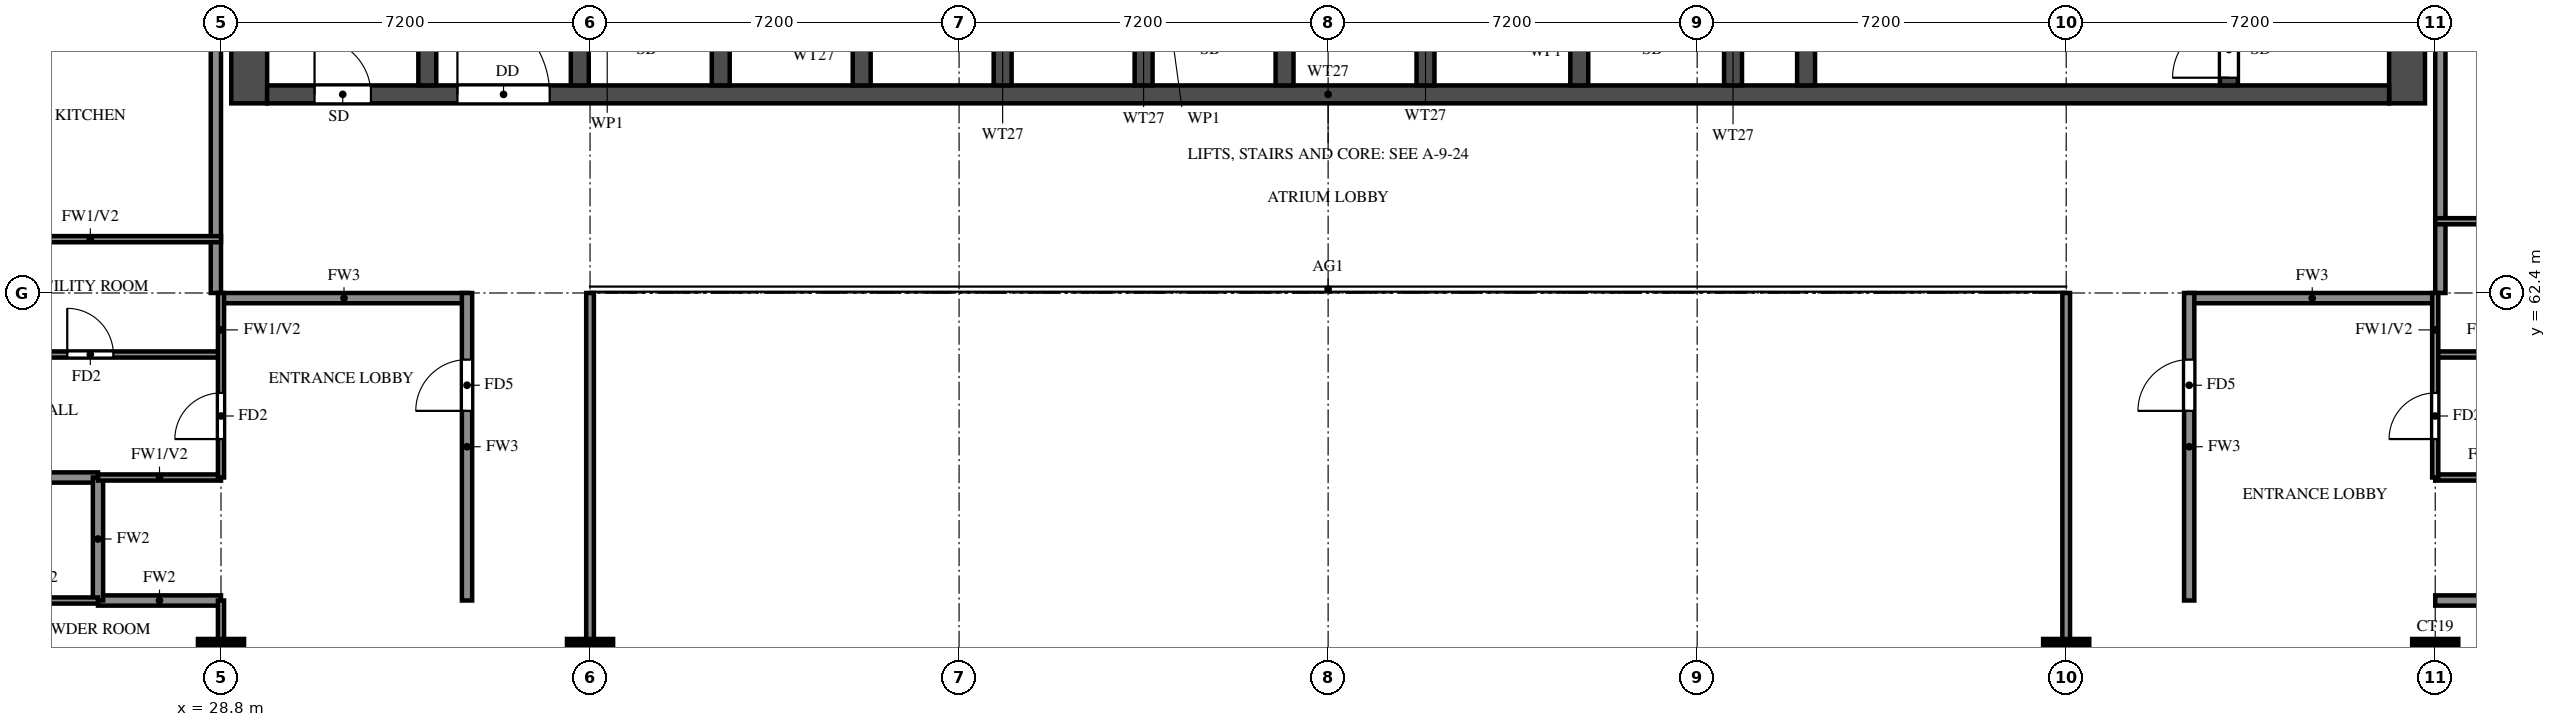
"""IFC4 building model, lengths in metres.
Left out: names, types, materials, properties, quantities, classifications, styles, units other than length and angle.
Written with IfcOpenShell. Run it as: python <this file> out.ifc"""

import sys

from ifc_helpers import new_model, si_unit, direction, frame, frame_2d, origin, origin_2d, place, context, subcontext, project, spatial, rectangle, extrude, source, transform, mapped, element, fill, save


model = new_model("IFC4")
c1 = context("Model", 3, precision=1e-05, world=origin(), true_north=direction((0.0, 1.0)))
c2 = subcontext(c1, "Body", "Model", "MODEL_VIEW")
j1 = project(units=[si_unit("LENGTHUNIT", "METRE"), si_unit("PLANEANGLEUNIT", "RADIAN")], contexts=[c1])
p1 = place(None, origin())
s1 = spatial("IfcSite", under=j1, at=p1, CompositionType="ELEMENT")
p2 = place(p1, origin())
s2 = spatial("IfcBuilding", under=s1, at=p2, CompositionType="ELEMENT")
p3 = place(p2, frame((0.0, 0.0, 178.0)))
s3 = spatial("IfcBuildingStorey", under=s2, at=p3, CompositionType="ELEMENT", Elevation=178.0)
m1 = source(origin(), c2, "Body", "SweptSolid", [
    extrude(rectangle(XDim=0.9, YDim=0.9, at=origin_2d()), origin(), (0.0, 0.0, 1.0), 3.2),
])
for number, where, z_axis, x_axis in (
    (1, (28.8, 55.2, 0.0), (0.0, 0.0, 1.0), (1.0, 0.0, 0.0)),
    (2, (36.0, 55.2, 0.0), (0.0, 0.0, 1.0), (1.0, 0.0, 0.0)),
    (3, (64.8, 55.2, 0.0), (0.0, 0.0, 1.0), (1.0, 0.0, 0.0)),
    (4, (72.0, 55.2, 0.0), (0.0, 0.0, 1.0), (1.0, 0.0, 0.0)),
):
    element("IfcColumn", number, at=place(p3, frame(where, z_axis=z_axis, x_axis=x_axis)), inside=s3, PredefinedType="COLUMN", context=c2, shape_type="MappedRepresentation", body=[
        mapped(m1, transform((0.0, 0.0, 0.0))),
    ])
for number, where, z_axis, x_axis in (
    (5, (29.35, 66.1, 0.0), (0.0, 0.0, 1.0), (0.0, 1.0, 0.0)),
    (6, (71.45, 66.1, 0.0), (0.0, 0.0, 1.0), (0.0, 1.0, 0.0)),
):
    element("IfcWall", number, at=place(p3, frame(where, z_axis=z_axis, x_axis=x_axis)), inside=s3, PredefinedType="SHEAR", context=c2, shape_type="SweptSolid", body=[
        extrude(rectangle(XDim=11.9, YDim=0.7, at=frame_2d((5.95, 0.0))), origin(), (0.0, 0.0, 1.0), 3.2),
    ])
p4 = place(p3, frame((29.7, 66.275, 0.0), z_axis=(0.0, 0.0, 1.0), x_axis=(1.0, 0.0, 0.0)))
e7 = element("IfcWall", 7, at=p4, inside=s3, PredefinedType="SHEAR", context=c2, shape_type="SweptSolid", body=[
    extrude(rectangle(XDim=41.4, YDim=0.35, at=frame_2d((20.7, 0.0))), origin(), (0.0, 0.0, 1.0), 3.2),
])
p5 = place(p4, frame((0.925, 0.0, 0.0)))
e8 = element("IfcOpeningElement", 8, at=p5, cuts=e7, PredefinedType="OPENING", context=c2, shape_type="SweptSolid", body=[
    extrude(rectangle(XDim=1.1, YDim=2.1, at=frame_2d((0.55, 1.05))), frame((0.0, 0.185, 0.0), z_axis=(0.0, -1.0, 0.0), x_axis=(1.0, 0.0, 0.0)), (0.0, 0.0, 1.0), 0.37),
])
p6 = place(p4, frame((3.712, 0.0, 0.0)))
e9 = element("IfcOpeningElement", 9, at=p6, cuts=e7, PredefinedType="OPENING", context=c2, shape_type="SweptSolid", body=[
    extrude(rectangle(XDim=1.8, YDim=2.1, at=frame_2d((0.9, 1.05))), frame((0.0, 0.185, 0.0), z_axis=(0.0, -1.0, 0.0), x_axis=(1.0, 0.0, 0.0)), (0.0, 0.0, 1.0), 0.37),
])
p7 = place(p3, frame((32.825, 66.45, 0.0), z_axis=(0.0, 0.0, 1.0), x_axis=(0.0, 1.0, 0.0)))
e10 = element("IfcWall", 10, at=p7, inside=s3, PredefinedType="SHEAR", context=c2, shape_type="SweptSolid", body=[
    extrude(rectangle(XDim=10.85, YDim=0.35, at=frame_2d((5.425, 0.0))), origin(), (0.0, 0.0, 1.0), 3.2),
])
p8 = place(p3, frame((67.975, 66.45, 0.0), z_axis=(0.0, 0.0, 1.0), x_axis=(0.0, 1.0, 0.0)))
e11 = element("IfcWall", 11, at=p8, inside=s3, PredefinedType="SHEAR", context=c2, shape_type="SweptSolid", body=[
    extrude(rectangle(XDim=10.85, YDim=0.35, at=frame_2d((5.425, 0.0))), origin(), (0.0, 0.0, 1.0), 3.2),
])
p9 = place(p8, frame((0.15, 0.0, 0.0)))
e12 = element("IfcOpeningElement", 12, at=p9, cuts=e11, PredefinedType="OPENING", context=c2, shape_type="SweptSolid", body=[
    extrude(rectangle(XDim=1.1, YDim=2.1, at=frame_2d((0.55, 1.05))), frame((0.0, 0.185, 0.0), z_axis=(0.0, -1.0, 0.0), x_axis=(1.0, 0.0, 0.0)), (0.0, 0.0, 1.0), 0.37),
])
p10 = place(p3, frame((59.725, 66.45, 0.0), z_axis=(0.0, 0.0, 1.0), x_axis=(0.0, 1.0, 0.0)))
e13 = element("IfcWall", 13, at=p10, inside=s3, PredefinedType="SHEAR", context=c2, shape_type="SweptSolid", body=[
    extrude(rectangle(XDim=6.125, YDim=0.35, at=frame_2d((3.062, 0.0))), origin(), (0.0, 0.0, 1.0), 3.2),
])
p11 = place(p10, frame((3.85, 0.0, 0.0)))
e14 = element("IfcOpeningElement", 14, at=p11, cuts=e13, PredefinedType="OPENING", context=c2, shape_type="SweptSolid", body=[
    extrude(rectangle(XDim=1.2, YDim=2.1, at=frame_2d((0.6, 1.05))), frame((0.0, 0.185, 0.0), z_axis=(0.0, -1.0, 0.0), x_axis=(1.0, 0.0, 0.0)), (0.0, 0.0, 1.0), 0.37),
])
for number, where, z_axis, x_axis in (
    (15, (35.8, 66.45, 0.0), (0.0, 0.0, 1.0), (0.0, 1.0, 0.0)),
    (16, (38.55, 66.45, 0.0), (0.0, 0.0, 1.0), (0.0, 1.0, 0.0)),
    (17, (41.3, 66.45, 0.0), (0.0, 0.0, 1.0), (0.0, 1.0, 0.0)),
    (18, (44.05, 66.45, 0.0), (0.0, 0.0, 1.0), (0.0, 1.0, 0.0)),
    (19, (46.8, 66.45, 0.0), (0.0, 0.0, 1.0), (0.0, 1.0, 0.0)),
    (20, (49.55, 66.45, 0.0), (0.0, 0.0, 1.0), (0.0, 1.0, 0.0)),
    (21, (52.3, 66.45, 0.0), (0.0, 0.0, 1.0), (0.0, 1.0, 0.0)),
    (22, (55.3, 66.45, 0.0), (0.0, 0.0, 1.0), (0.0, 1.0, 0.0)),
    (23, (58.3, 66.45, 0.0), (0.0, 0.0, 1.0), (0.0, 1.0, 0.0)),
):
    element("IfcWall", number, at=place(p3, frame(where, z_axis=z_axis, x_axis=x_axis)), inside=s3, PredefinedType="SHEAR", context=c2, shape_type="SweptSolid", body=[
        extrude(rectangle(XDim=2.425, YDim=0.35, at=frame_2d((1.212, 0.0))), origin(), (0.0, 0.0, 1.0), 3.2),
    ])
for number, where, z_axis, x_axis in (
    (24, (28.8, 62.3, 0.0), (0.0, 0.0, 1.0), (1.0, 0.0, 0.0)),
    (25, (67.2, 62.3, 0.0), (0.0, 0.0, 1.0), (1.0, 0.0, 0.0)),
):
    element("IfcWall", number, at=place(p3, frame(where, z_axis=z_axis, x_axis=x_axis)), inside=s3, PredefinedType="SOLIDWALL", context=c2, shape_type="SweptSolid", body=[
        extrude(rectangle(XDim=4.8, YDim=0.2, at=frame_2d((2.4, 0.0))), origin(), (0.0, 0.0, 1.0), 3.2),
    ])
p12 = place(p3, frame((28.7, 62.4, 0.0), z_axis=(0.0, 0.0, 1.0), x_axis=(0.0, 1.0, 0.0)))
e26 = element("IfcWall", 26, at=p12, inside=s3, PredefinedType="SOLIDWALL", context=c2, shape_type="SweptSolid", body=[
    extrude(rectangle(XDim=15.6, YDim=0.2, at=frame_2d((7.8, 0.0))), origin(), (0.0, 0.0, 1.0), 3.2),
])
p13 = place(p3, frame((33.6, 56.4, 0.0), z_axis=(0.0, 0.0, 1.0), x_axis=(0.0, 1.0, 0.0)))
e27 = element("IfcWall", 27, at=p13, inside=s3, PredefinedType="SOLIDWALL", context=c2, shape_type="SweptSolid", body=[
    extrude(rectangle(XDim=6.0, YDim=0.2, at=frame_2d((3.0, 0.0))), origin(), (0.0, 0.0, 1.0), 3.2),
])
p14 = place(p13, frame((3.7, 0.0, 0.0)))
e28 = element("IfcOpeningElement", 28, at=p14, cuts=e27, PredefinedType="OPENING", context=c2, shape_type="SweptSolid", body=[
    extrude(rectangle(XDim=1.0, YDim=2.1, at=frame_2d((0.5, 1.05))), frame((0.0, 0.11, 0.0), z_axis=(0.0, -1.0, 0.0), x_axis=(1.0, 0.0, 0.0)), (0.0, 0.0, 1.0), 0.22),
])
p15 = place(p3, frame((67.2, 56.4, 0.0), z_axis=(0.0, 0.0, 1.0), x_axis=(0.0, 1.0, 0.0)))
e29 = element("IfcWall", 29, at=p15, inside=s3, PredefinedType="SOLIDWALL", context=c2, shape_type="SweptSolid", body=[
    extrude(rectangle(XDim=6.0, YDim=0.2, at=frame_2d((3.0, 0.0))), origin(), (0.0, 0.0, 1.0), 3.2),
])
p16 = place(p15, frame((3.7, 0.0, 0.0)))
e30 = element("IfcOpeningElement", 30, at=p16, cuts=e29, PredefinedType="OPENING", context=c2, shape_type="SweptSolid", body=[
    extrude(rectangle(XDim=1.0, YDim=2.1, at=frame_2d((0.5, 1.05))), frame((0.0, 0.11, 0.0), z_axis=(0.0, -1.0, 0.0), x_axis=(1.0, 0.0, 0.0)), (0.0, 0.0, 1.0), 0.22),
])
p17 = place(p3, frame((72.1, 62.4, 0.0), z_axis=(0.0, 0.0, 1.0), x_axis=(0.0, 1.0, 0.0)))
e31 = element("IfcWall", 31, at=p17, inside=s3, PredefinedType="SOLIDWALL", context=c2, shape_type="SweptSolid", body=[
    extrude(rectangle(XDim=15.6, YDim=0.2, at=frame_2d((7.8, 0.0))), origin(), (0.0, 0.0, 1.0), 3.2),
])
p18 = place(p3, frame((26.4, 56.4, 0.0), z_axis=(0.0, 0.0, 1.0), x_axis=(1.0, 0.0, 0.0)))
e32 = element("IfcWall", 32, at=p18, inside=s3, PredefinedType="SOLIDWALL", context=c2, shape_type="SweptSolid", body=[
    extrude(rectangle(XDim=2.4, YDim=0.2, at=frame_2d((1.2, 0.0))), origin(), (0.0, 0.0, 1.0), 3.2),
])
p19 = place(p3, frame((72.0, 56.4, 0.0), z_axis=(0.0, 0.0, 1.0), x_axis=(1.0, 0.0, 0.0)))
e33 = element("IfcWall", 33, at=p19, inside=s3, PredefinedType="SOLIDWALL", context=c2, shape_type="SweptSolid", body=[
    extrude(rectangle(XDim=2.4, YDim=0.2, at=frame_2d((1.2, 0.0))), origin(), (0.0, 0.0, 1.0), 3.2),
])
p20 = place(p3, frame((14.525, 58.8, 0.0), z_axis=(0.0, 0.0, 1.0), x_axis=(1.0, 0.0, 0.0)))
e34 = element("IfcWall", 34, at=p20, inside=s3, PredefinedType="SOLIDWALL", context=c2, shape_type="SweptSolid", body=[
    extrude(rectangle(XDim=11.875, YDim=0.2, at=frame_2d((5.938, 0.0))), origin(), (0.0, 0.0, 1.0), 2.3),
])
p21 = place(p3, frame((26.4, 56.4, 0.0), z_axis=(0.0, 0.0, 1.0), x_axis=(0.0, 1.0, 0.0)))
e35 = element("IfcWall", 35, at=p21, inside=s3, PredefinedType="SOLIDWALL", context=c2, shape_type="SweptSolid", body=[
    extrude(rectangle(XDim=2.4, YDim=0.2, at=frame_2d((1.2, 0.0))), origin(), (0.0, 0.0, 1.0), 3.2),
])
p22 = place(p3, frame((23.7, 56.4, 0.0), z_axis=(0.0, 0.0, 1.0), x_axis=(1.0, 0.0, 0.0)))
e36 = element("IfcWall", 36, at=p22, inside=s3, PredefinedType="PARTITIONING", context=c2, shape_type="SweptSolid", body=[
    extrude(rectangle(XDim=2.7, YDim=0.12, at=frame_2d((1.35, 0.0))), origin(), (0.0, 0.0, 1.0), 3.2),
])
p23 = place(p3, frame((26.4, 58.8, 0.0), z_axis=(0.0, 0.0, 1.0), x_axis=(1.0, 0.0, 0.0)))
e37 = element("IfcWall", 37, at=p23, inside=s3, PredefinedType="PARTITIONING", context=c2, shape_type="SweptSolid", body=[
    extrude(rectangle(XDim=2.4, YDim=0.12, at=frame_2d((1.2, 0.0))), origin(), (0.0, 0.0, 1.0), 3.2),
])
p24 = place(p3, frame((72.0, 58.8, 0.0), z_axis=(0.0, 0.0, 1.0), x_axis=(1.0, 0.0, 0.0)))
e38 = element("IfcWall", 38, at=p24, inside=s3, PredefinedType="PARTITIONING", context=c2, shape_type="SweptSolid", body=[
    extrude(rectangle(XDim=2.4, YDim=0.12, at=frame_2d((1.2, 0.0))), origin(), (0.0, 0.0, 1.0), 3.2),
])
p25 = place(p3, frame((23.7, 61.2, 0.0), z_axis=(0.0, 0.0, 1.0), x_axis=(1.0, 0.0, 0.0)))
e39 = element("IfcWall", 39, at=p25, inside=s3, PredefinedType="PARTITIONING", context=c2, shape_type="SweptSolid", body=[
    extrude(rectangle(XDim=5.1, YDim=0.12, at=frame_2d((2.55, 0.0))), origin(), (0.0, 0.0, 1.0), 3.2),
])
p26 = place(p25, frame((2.1, 0.0, 0.0)))
e40 = element("IfcOpeningElement", 40, at=p26, cuts=e39, PredefinedType="OPENING", context=c2, shape_type="SweptSolid", body=[
    extrude(rectangle(XDim=0.9, YDim=2.1, at=frame_2d((0.45, 1.05))), frame((0.0, 0.07, 0.0), z_axis=(0.0, -1.0, 0.0), x_axis=(1.0, 0.0, 0.0)), (0.0, 0.0, 1.0), 0.14),
])
p27 = place(p3, frame((72.0, 61.2, 0.0), z_axis=(0.0, 0.0, 1.0), x_axis=(1.0, 0.0, 0.0)))
e41 = element("IfcWall", 41, at=p27, inside=s3, PredefinedType="PARTITIONING", context=c2, shape_type="SweptSolid", body=[
    extrude(rectangle(XDim=5.1, YDim=0.12, at=frame_2d((2.55, 0.0))), origin(), (0.0, 0.0, 1.0), 3.2),
])
p28 = place(p27, frame((2.1, 0.0, 0.0)))
e42 = element("IfcOpeningElement", 42, at=p28, cuts=e41, PredefinedType="OPENING", context=c2, shape_type="SweptSolid", body=[
    extrude(rectangle(XDim=0.9, YDim=2.1, at=frame_2d((0.45, 1.05))), frame((0.0, 0.07, 0.0), z_axis=(0.0, -1.0, 0.0), x_axis=(1.0, 0.0, 0.0)), (0.0, 0.0, 1.0), 0.14),
])
for number, where, z_axis, x_axis in (
    (43, (23.7, 63.45, 0.0), (0.0, 0.0, 1.0), (1.0, 0.0, 0.0)),
    (44, (72.0, 63.8, 0.0), (0.0, 0.0, 1.0), (1.0, 0.0, 0.0)),
):
    element("IfcWall", number, at=place(p3, frame(where, z_axis=z_axis, x_axis=x_axis)), inside=s3, PredefinedType="PARTITIONING", context=c2, shape_type="SweptSolid", body=[
        extrude(rectangle(XDim=5.1, YDim=0.12, at=frame_2d((2.55, 0.0))), origin(), (0.0, 0.0, 1.0), 3.2),
    ])
p29 = place(p3, frame((28.8, 54.0, 0.0), z_axis=(0.0, 0.0, 1.0), x_axis=(0.0, 1.0, 0.0)))
e45 = element("IfcWall", 45, at=p29, inside=s3, PredefinedType="PARTITIONING", context=c2, shape_type="SweptSolid", body=[
    extrude(rectangle(XDim=2.4, YDim=0.12, at=frame_2d((1.2, 0.0))), origin(), (0.0, 0.0, 1.0), 3.2),
])
p30 = place(p3, frame((28.8, 58.8, 0.0), z_axis=(0.0, 0.0, 1.0), x_axis=(0.0, 1.0, 0.0)))
e46 = element("IfcWall", 46, at=p30, inside=s3, PredefinedType="PARTITIONING", context=c2, shape_type="SweptSolid", body=[
    extrude(rectangle(XDim=3.6, YDim=0.12, at=frame_2d((1.8, 0.0))), origin(), (0.0, 0.0, 1.0), 3.2),
])
p31 = place(p30, frame((0.75, 0.0, 0.0)))
e47 = element("IfcOpeningElement", 47, at=p31, cuts=e46, PredefinedType="OPENING", context=c2, shape_type="SweptSolid", body=[
    extrude(rectangle(XDim=0.9, YDim=2.1, at=frame_2d((0.45, 1.05))), frame((0.0, 0.07, 0.0), z_axis=(0.0, -1.0, 0.0), x_axis=(1.0, 0.0, 0.0)), (0.0, 0.0, 1.0), 0.14),
])
p32 = place(p3, frame((72.0, 58.8, 0.0), z_axis=(0.0, 0.0, 1.0), x_axis=(0.0, 1.0, 0.0)))
e48 = element("IfcWall", 48, at=p32, inside=s3, PredefinedType="PARTITIONING", context=c2, shape_type="SweptSolid", body=[
    extrude(rectangle(XDim=3.6, YDim=0.12, at=frame_2d((1.8, 0.0))), origin(), (0.0, 0.0, 1.0), 3.2),
])
p33 = place(p32, frame((0.75, 0.0, 0.0)))
e49 = element("IfcOpeningElement", 49, at=p33, cuts=e48, PredefinedType="OPENING", context=c2, shape_type="SweptSolid", body=[
    extrude(rectangle(XDim=0.9, YDim=2.1, at=frame_2d((0.45, 1.05))), frame((0.0, 0.07, 0.0), z_axis=(0.0, -1.0, 0.0), x_axis=(1.0, 0.0, 0.0)), (0.0, 0.0, 1.0), 0.14),
])
for number, where, z_axis, x_axis in (
    (50, (36.0, 48.0, 0.0), (0.0, 0.0, 1.0), (0.0, 1.0, 0.0)),
    (51, (64.8, 48.0, 0.0), (0.0, 0.0, 1.0), (0.0, 1.0, 0.0)),
):
    element("IfcWall", number, at=place(p3, frame(where, z_axis=z_axis, x_axis=x_axis)), inside=s3, PredefinedType="SOLIDWALL", context=c2, shape_type="SweptSolid", body=[
        extrude(rectangle(XDim=14.4, YDim=0.15, at=frame_2d((7.2, 0.0))), origin(), (0.0, 0.0, 1.0), 2.3),
    ])
p34 = place(p5, origin())
e52 = element("IfcDoor", 52, at=p34, inside=s3, OperationType="SINGLE_SWING_LEFT", PredefinedType="DOOR", context=c2, shape_type="SweptSolid", body=[
    extrude(rectangle(XDim=1.1, YDim=2.1, at=frame_2d((0.55, 1.05))), frame((0.0, 0.025, 0.0), z_axis=(0.0, -1.0, 0.0), x_axis=(1.0, 0.0, 0.0)), (0.0, 0.0, 1.0), 0.05),
])
fill(e8, e52)
p35 = place(p9, origin())
e53 = element("IfcDoor", 53, at=p35, inside=s3, OperationType="SINGLE_SWING_LEFT", PredefinedType="DOOR", context=c2, shape_type="SweptSolid", body=[
    extrude(rectangle(XDim=1.1, YDim=2.1, at=frame_2d((0.55, 1.05))), frame((0.0, 0.025, 0.0), z_axis=(0.0, -1.0, 0.0), x_axis=(1.0, 0.0, 0.0)), (0.0, 0.0, 1.0), 0.05),
])
fill(e12, e53)
p36 = place(p6, origin())
e54 = element("IfcDoor", 54, at=p36, inside=s3, OperationType="DOUBLE_DOOR_SINGLE_SWING", PredefinedType="DOOR", context=c2, shape_type="SweptSolid", body=[
    extrude(rectangle(XDim=1.8, YDim=2.1, at=frame_2d((0.9, 1.05))), frame((0.0, 0.025, 0.0), z_axis=(0.0, -1.0, 0.0), x_axis=(1.0, 0.0, 0.0)), (0.0, 0.0, 1.0), 0.05),
])
fill(e9, e54)
p37 = place(p31, origin())
e55 = element("IfcDoor", 55, at=p37, inside=s3, OperationType="SINGLE_SWING_RIGHT", PredefinedType="DOOR", context=c2, shape_type="SweptSolid", body=[
    extrude(rectangle(XDim=0.9, YDim=2.1, at=frame_2d((0.45, 1.05))), frame((0.0, 0.025, 0.0), z_axis=(0.0, -1.0, 0.0), x_axis=(1.0, 0.0, 0.0)), (0.0, 0.0, 1.0), 0.05),
])
fill(e47, e55)
p38 = place(p14, origin())
e56 = element("IfcDoor", 56, at=p38, inside=s3, OperationType="SINGLE_SWING_LEFT", PredefinedType="DOOR", context=c2, shape_type="SweptSolid", body=[
    extrude(rectangle(XDim=1.0, YDim=2.1, at=frame_2d((0.5, 1.05))), frame((0.0, 0.025, 0.0), z_axis=(0.0, -1.0, 0.0), x_axis=(1.0, 0.0, 0.0)), (0.0, 0.0, 1.0), 0.05),
])
fill(e28, e56)
p39 = place(p26, origin())
e57 = element("IfcDoor", 57, at=p39, inside=s3, OperationType="SINGLE_SWING_RIGHT", PredefinedType="DOOR", context=c2, shape_type="SweptSolid", body=[
    extrude(rectangle(XDim=0.9, YDim=2.1, at=frame_2d((0.45, 1.05))), frame((0.0, 0.025, 0.0), z_axis=(0.0, -1.0, 0.0), x_axis=(1.0, 0.0, 0.0)), (0.0, 0.0, 1.0), 0.05),
])
fill(e40, e57)
p40 = place(p33, origin())
e58 = element("IfcDoor", 58, at=p40, inside=s3, OperationType="SINGLE_SWING_LEFT", PredefinedType="DOOR", context=c2, shape_type="SweptSolid", body=[
    extrude(rectangle(XDim=0.9, YDim=2.1, at=frame_2d((0.45, 1.05))), frame((0.0, 0.025, 0.0), z_axis=(0.0, -1.0, 0.0), x_axis=(1.0, 0.0, 0.0)), (0.0, 0.0, 1.0), 0.05),
])
fill(e49, e58)
p41 = place(p16, origin())
e59 = element("IfcDoor", 59, at=p41, inside=s3, OperationType="SINGLE_SWING_LEFT", PredefinedType="DOOR", context=c2, shape_type="SweptSolid", body=[
    extrude(rectangle(XDim=1.0, YDim=2.1, at=frame_2d((0.5, 1.05))), frame((0.0, 0.025, 0.0), z_axis=(0.0, -1.0, 0.0), x_axis=(1.0, 0.0, 0.0)), (0.0, 0.0, 1.0), 0.05),
])
fill(e30, e59)
save(model, sys.argv[1])
